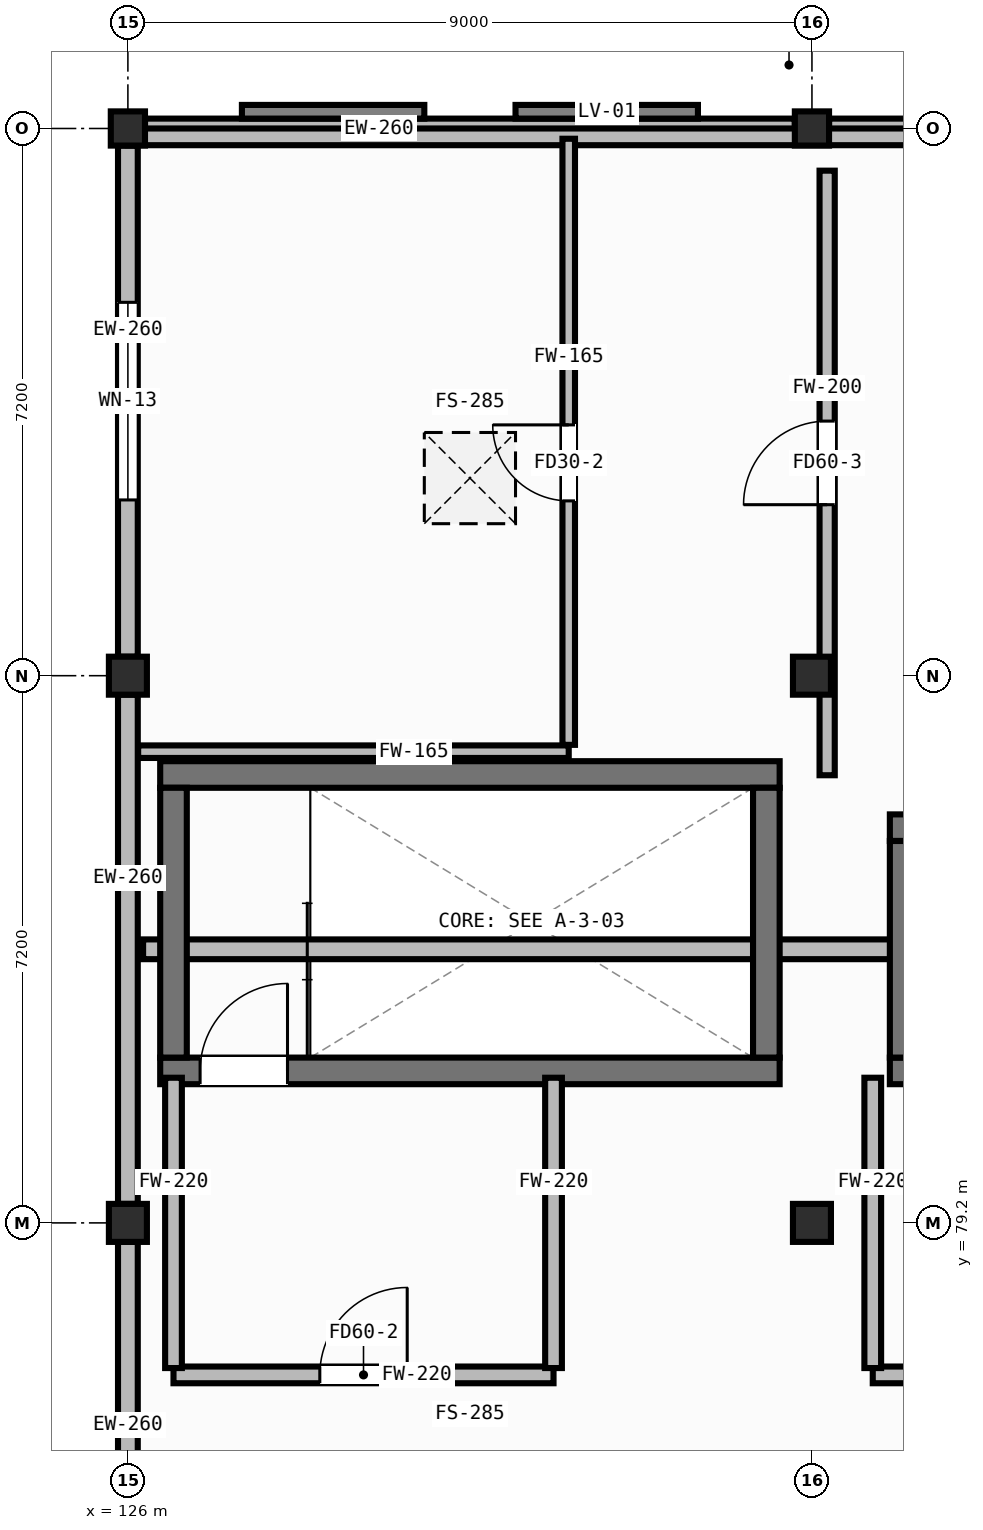
"""IFC4 building model, lengths in metres.
Left out: names, types, materials, properties, quantities, classifications, styles, units other than length and angle.
Written with IfcOpenShell. Run it as: python <this file> out.ifc"""

import sys

from ifc_helpers import new_model, si_unit, direction, frame, frame_2d, origin, origin_2d, place, context, subcontext, project, spatial, rectangle, hollow_rectangle, extrude, element, fill, save


model = new_model("IFC4")
c1 = context("Model", 3, precision=1e-05, world=origin(), true_north=direction((0.0, 1.0)))
c2 = subcontext(c1, "Body", "Model", "MODEL_VIEW")
j1 = project(units=[si_unit("LENGTHUNIT", "METRE"), si_unit("PLANEANGLEUNIT", "RADIAN")], contexts=[c1])
p1 = place(None, origin())
s1 = spatial("IfcSite", under=j1, at=p1, CompositionType="ELEMENT")
p2 = place(p1, origin())
s2 = spatial("IfcBuilding", under=s1, at=p2, CompositionType="ELEMENT")
p3 = place(p2, frame((0.0, 0.0, 31.4)))
s3 = spatial("IfcBuildingStorey", under=s2, at=p3, CompositionType="ELEMENT", Elevation=31.4)
for number, where, z_axis, x_axis in (
    (1, (126.0, 79.2, 0.0), (0.0, 0.0, 1.0), (1.0, 0.0, 0.0)),
    (2, (126.0, 86.4, 0.0), (0.0, 0.0, 1.0), (1.0, 0.0, 0.0)),
):
    element("IfcColumn", number, at=place(p3, frame(where, z_axis=z_axis, x_axis=x_axis)), inside=s3, PredefinedType="COLUMN", context=c2, shape_type="SweptSolid", body=[
        extrude(hollow_rectangle(XDim=0.5, YDim=0.5, WallThickness=0.022, at=origin_2d()), origin(), (0.0, 0.0, 1.0), 3.56),
    ])
p4 = place(p3, frame((126.0, 93.6, 0.0), z_axis=(0.0, 0.0, 1.0), x_axis=(1.0, 0.0, 0.0)))
e3 = element("IfcColumn", 3, at=p4, inside=s3, PredefinedType="COLUMN", context=c2, shape_type="SweptSolid", body=[
    extrude(hollow_rectangle(XDim=0.45, YDim=0.45, WallThickness=0.019, at=origin_2d()), origin(), (0.0, 0.0, 1.0), 3.56),
])
for number, where, z_axis, x_axis in (
    (4, (135.0, 79.2, 0.0), (0.0, 0.0, 1.0), (1.0, 0.0, 0.0)),
    (5, (135.0, 86.4, 0.0), (0.0, 0.0, 1.0), (1.0, 0.0, 0.0)),
):
    element("IfcColumn", number, at=place(p3, frame(where, z_axis=z_axis, x_axis=x_axis)), inside=s3, PredefinedType="COLUMN", context=c2, shape_type="SweptSolid", body=[
        extrude(hollow_rectangle(XDim=0.5, YDim=0.5, WallThickness=0.022, at=origin_2d()), origin(), (0.0, 0.0, 1.0), 3.56),
    ])
p5 = place(p3, frame((135.0, 93.6, 0.0), z_axis=(0.0, 0.0, 1.0), x_axis=(1.0, 0.0, 0.0)))
e6 = element("IfcColumn", 6, at=p5, inside=s3, PredefinedType="COLUMN", context=c2, shape_type="SweptSolid", body=[
    extrude(hollow_rectangle(XDim=0.45, YDim=0.45, WallThickness=0.019, at=origin_2d()), origin(), (0.0, 0.0, 1.0), 3.56),
])
for number, where, z_axis, x_axis in (
    (7, (134.775, 93.6, 0.0), (0.0, 0.0, 1.0), (-1.0, 0.0, 0.0)),
    (8, (143.775, 93.6, 0.0), (0.0, 0.0, 1.0), (-1.0, 0.0, 0.0)),
):
    element("IfcWall", number, at=place(p3, frame(where, z_axis=z_axis, x_axis=x_axis)), inside=s3, PredefinedType="STANDARD", context=c2, shape_type="SweptSolid", body=[
        extrude(rectangle(XDim=8.55, YDim=0.26, at=frame_2d((4.275, 0.0))), origin(), (0.0, 0.0, 1.0), 3.16),
    ])
for number, where, z_axis, x_axis in (
    (9, (126.0, 72.25, 0.0), (0.0, 0.0, 1.0), (0.0, 1.0, 0.0)),
    (10, (126.0, 79.45, 0.0), (0.0, 0.0, 1.0), (0.0, 1.0, 0.0)),
):
    element("IfcWall", number, at=place(p3, frame(where, z_axis=z_axis, x_axis=x_axis)), inside=s3, PredefinedType="STANDARD", context=c2, shape_type="SweptSolid", body=[
        extrude(rectangle(XDim=6.7, YDim=0.26, at=frame_2d((3.35, 0.0))), origin(), (0.0, 0.0, 1.0), 3.16),
    ])
p6 = place(p3, frame((126.0, 86.65, 0.0), z_axis=(0.0, 0.0, 1.0), x_axis=(0.0, 1.0, 0.0)))
e11 = element("IfcWall", 11, at=p6, inside=s3, PredefinedType="STANDARD", context=c2, shape_type="SweptSolid", body=[
    extrude(rectangle(XDim=6.725, YDim=0.26, at=frame_2d((3.363, 0.0))), origin(), (0.0, 0.0, 1.0), 3.16),
])
p7 = place(p6, frame((2.062, 0.0, 0.85)))
e12 = element("IfcOpeningElement", 12, at=p7, cuts=e11, PredefinedType="OPENING", context=c2, shape_type="SweptSolid", body=[
    extrude(rectangle(XDim=2.6, YDim=1.6, at=frame_2d((1.3, 0.8))), frame((0.0, 0.142, 0.0), z_axis=(0.0, -1.0, 0.0), x_axis=(1.0, 0.0, 0.0)), (0.0, 0.0, 1.0), 0.284),
])
p8 = place(p3, frame((126.2, 82.8, 3.8), z_axis=(0.0, 0.0, 1.0), x_axis=(1.0, 0.0, 0.0)))
e13 = element("IfcWall", 13, at=p8, inside=s3, PredefinedType="STANDARD", context=c2, shape_type="SweptSolid", body=[
    extrude(rectangle(XDim=35.6, YDim=0.26, at=frame_2d((17.8, 0.0))), origin(), (0.0, 0.0, 1.0), 2.15),
])
p9 = place(p3, frame((126.0, 93.49, 3.8), z_axis=(0.0, 0.0, 1.0), x_axis=(1.0, 0.0, 0.0)))
e14 = element("IfcWall", 14, at=p9, inside=s3, PredefinedType="PARAPET", context=c2, shape_type="SweptSolid", body=[
    extrude(rectangle(XDim=36.0, YDim=0.22, at=frame_2d((18.0, 0.0))), origin(), (0.0, 0.0, 1.0), 0.9),
])
p10 = place(p3, frame((126.425, 81.2, 0.0), z_axis=(0.0, 0.0, 1.0), x_axis=(1.0, 0.0, 0.0)))
e15 = element("IfcWall", 15, at=p10, inside=s3, PredefinedType="SHEAR", context=c2, shape_type="SweptSolid", body=[
    extrude(rectangle(XDim=8.15, YDim=0.35, at=frame_2d((4.075, 0.0))), origin(), (0.0, 0.0, 1.0), 3.56),
])
p11 = place(p10, frame((0.525, 0.0, 0.0)))
e16 = element("IfcOpeningElement", 16, at=p11, cuts=e15, PredefinedType="OPENING", context=c2, shape_type="SweptSolid", body=[
    extrude(rectangle(XDim=1.15, YDim=2.1, at=frame_2d((0.575, 1.05))), frame((0.0, 0.187, 0.0), z_axis=(0.0, -1.0, 0.0), x_axis=(1.0, 0.0, 0.0)), (0.0, 0.0, 1.0), 0.374),
])
p12 = place(p3, frame((126.425, 85.1, 0.0), z_axis=(0.0, 0.0, 1.0), x_axis=(1.0, 0.0, 0.0)))
e17 = element("IfcWall", 17, at=p12, inside=s3, PredefinedType="SHEAR", context=c2, shape_type="SweptSolid", body=[
    extrude(rectangle(XDim=8.15, YDim=0.35, at=frame_2d((4.075, 0.0))), origin(), (0.0, 0.0, 1.0), 3.56),
])
for number, where, z_axis, x_axis in (
    (18, (126.6, 81.375, 0.0), (0.0, 0.0, 1.0), (0.0, 1.0, 0.0)),
    (19, (134.4, 81.375, 0.0), (0.0, 0.0, 1.0), (0.0, 1.0, 0.0)),
):
    element("IfcWall", number, at=place(p3, frame(where, z_axis=z_axis, x_axis=x_axis)), inside=s3, PredefinedType="SHEAR", context=c2, shape_type="SweptSolid", body=[
        extrude(rectangle(XDim=3.55, YDim=0.35, at=frame_2d((1.775, 0.0))), origin(), (0.0, 0.0, 1.0), 3.56),
    ])
p13 = place(p3, frame((136.025, 81.2, 0.0), z_axis=(0.0, 0.0, 1.0), x_axis=(1.0, 0.0, 0.0)))
e20 = element("IfcWall", 20, at=p13, inside=s3, PredefinedType="SHEAR", context=c2, shape_type="SweptSolid", body=[
    extrude(rectangle(XDim=2.75, YDim=0.35, at=frame_2d((1.375, 0.0))), origin(), (0.0, 0.0, 1.0), 4.25),
])
p14 = place(p13, frame((0.8, 0.0, 0.0)))
e21 = element("IfcOpeningElement", 21, at=p14, cuts=e20, PredefinedType="OPENING", context=c2, shape_type="SweptSolid", body=[
    extrude(rectangle(XDim=1.15, YDim=2.12, at=frame_2d((0.575, 1.06))), frame((0.0, 0.187, 0.0), z_axis=(0.0, -1.0, 0.0), x_axis=(1.0, 0.0, 0.0)), (0.0, 0.0, 1.0), 0.374),
])
p15 = place(p3, frame((136.025, 84.4, 0.0), z_axis=(0.0, 0.0, 1.0), x_axis=(1.0, 0.0, 0.0)))
e22 = element("IfcWall", 22, at=p15, inside=s3, PredefinedType="SHEAR", context=c2, shape_type="SweptSolid", body=[
    extrude(rectangle(XDim=2.75, YDim=0.35, at=frame_2d((1.375, 0.0))), origin(), (0.0, 0.0, 1.0), 4.25),
])
p16 = place(p3, frame((136.2, 81.375, 0.0), z_axis=(0.0, 0.0, 1.0), x_axis=(0.0, 1.0, 0.0)))
e23 = element("IfcWall", 23, at=p16, inside=s3, PredefinedType="SHEAR", context=c2, shape_type="SweptSolid", body=[
    extrude(rectangle(XDim=2.85, YDim=0.35, at=frame_2d((1.425, 0.0))), origin(), (0.0, 0.0, 1.0), 4.25),
])
p17 = place(p3, frame((126.6, 77.2, 0.0), z_axis=(0.0, 0.0, 1.0), x_axis=(1.0, 0.0, 0.0)))
e24 = element("IfcWall", 24, at=p17, inside=s3, PredefinedType="PARTITIONING", context=c2, shape_type="SweptSolid", body=[
    extrude(rectangle(XDim=5.0, YDim=0.22, at=frame_2d((2.5, 0.0))), origin(), (0.0, 0.0, 1.0), 3.56),
])
p18 = place(p17, frame((1.925, 0.0, 0.0)))
e25 = element("IfcOpeningElement", 25, at=p18, cuts=e24, PredefinedType="OPENING", context=c2, shape_type="SweptSolid", body=[
    extrude(rectangle(XDim=1.15, YDim=2.1, at=frame_2d((0.575, 1.05))), frame((0.0, 0.122, 0.0), z_axis=(0.0, -1.0, 0.0), x_axis=(1.0, 0.0, 0.0)), (0.0, 0.0, 1.0), 0.244),
])
for number, where, z_axis, x_axis in (
    (26, (126.6, 77.29, 0.0), (0.0, 0.0, 1.0), (0.0, 1.0, 0.0)),
    (27, (131.6, 77.29, 0.0), (0.0, 0.0, 1.0), (0.0, 1.0, 0.0)),
):
    element("IfcWall", number, at=place(p3, frame(where, z_axis=z_axis, x_axis=x_axis)), inside=s3, PredefinedType="PARTITIONING", context=c2, shape_type="SweptSolid", body=[
        extrude(rectangle(XDim=3.82, YDim=0.22, at=frame_2d((1.91, 0.0))), origin(), (0.0, 0.0, 1.0), 3.56),
    ])
p19 = place(p3, frame((135.8, 77.2, 0.0), z_axis=(0.0, 0.0, 1.0), x_axis=(1.0, 0.0, 0.0)))
e28 = element("IfcWall", 28, at=p19, inside=s3, PredefinedType="PARTITIONING", context=c2, shape_type="SweptSolid", body=[
    extrude(rectangle(XDim=7.8, YDim=0.22, at=frame_2d((3.9, 0.0))), origin(), (0.0, 0.0, 1.0), 3.56),
])
p20 = place(p19, frame((3.175, 0.0, 0.0)))
e29 = element("IfcOpeningElement", 29, at=p20, cuts=e28, PredefinedType="OPENING", context=c2, shape_type="SweptSolid", body=[
    extrude(rectangle(XDim=1.05, YDim=2.02, at=frame_2d((0.525, 1.01))), frame((0.0, 0.122, 0.0), z_axis=(0.0, -1.0, 0.0), x_axis=(1.0, 0.0, 0.0)), (0.0, 0.0, 1.0), 0.244),
])
p21 = place(p3, frame((135.8, 77.29, 0.0), z_axis=(0.0, 0.0, 1.0), x_axis=(0.0, 1.0, 0.0)))
e30 = element("IfcWall", 30, at=p21, inside=s3, PredefinedType="PARTITIONING", context=c2, shape_type="SweptSolid", body=[
    extrude(rectangle(XDim=3.82, YDim=0.22, at=frame_2d((1.91, 0.0))), origin(), (0.0, 0.0, 1.0), 3.56),
])
p22 = place(p3, frame((126.135, 85.4, 0.0), z_axis=(0.0, 0.0, 1.0), x_axis=(1.0, 0.0, 0.0)))
e31 = element("IfcWall", 31, at=p22, inside=s3, PredefinedType="PARTITIONING", context=c2, shape_type="SweptSolid", body=[
    extrude(rectangle(XDim=5.665, YDim=0.165, at=frame_2d((2.833, 0.0))), origin(), (0.0, 0.0, 1.0), 3.56),
])
p23 = place(p3, frame((131.8, 85.49, 0.0), z_axis=(0.0, 0.0, 1.0), x_axis=(0.0, 1.0, 0.0)))
e32 = element("IfcWall", 32, at=p23, inside=s3, PredefinedType="PARTITIONING", context=c2, shape_type="SweptSolid", body=[
    extrude(rectangle(XDim=7.975, YDim=0.165, at=frame_2d((3.988, 0.0))), origin(), (0.0, 0.0, 1.0), 3.56),
])
p24 = place(p23, frame((3.21, 0.0, 0.0)))
e33 = element("IfcOpeningElement", 33, at=p24, cuts=e32, PredefinedType="OPENING", context=c2, shape_type="SweptSolid", body=[
    extrude(rectangle(XDim=1.0, YDim=2.08, at=frame_2d((0.5, 1.04))), frame((0.0, 0.094, 0.0), z_axis=(0.0, -1.0, 0.0), x_axis=(1.0, 0.0, 0.0)), (0.0, 0.0, 1.0), 0.189),
])
p25 = place(p3, frame((135.2, 85.09, 0.0), z_axis=(0.0, 0.0, 1.0), x_axis=(0.0, 1.0, 0.0)))
e34 = element("IfcWall", 34, at=p25, inside=s3, PredefinedType="PARTITIONING", context=c2, shape_type="SweptSolid", body=[
    extrude(rectangle(XDim=7.955, YDim=0.2, at=frame_2d((3.978, 0.0))), origin(), (0.0, 0.0, 1.0), 2.84),
])
p26 = place(p25, frame((3.56, 0.0, 0.0)))
e35 = element("IfcOpeningElement", 35, at=p26, cuts=e34, PredefinedType="OPENING", context=c2, shape_type="SweptSolid", body=[
    extrude(rectangle(XDim=1.1, YDim=2.08, at=frame_2d((0.55, 1.04))), frame((0.0, 0.112, 0.0), z_axis=(0.0, -1.0, 0.0), x_axis=(1.0, 0.0, 0.0)), (0.0, 0.0, 1.0), 0.224),
])
p27 = place(p7, origin())
e36 = element("IfcWindow", 36, at=p27, inside=s3, PartitioningType="DOUBLE_PANEL_VERTICAL", PredefinedType="WINDOW", context=c2, shape_type="SweptSolid", body=[
    extrude(rectangle(XDim=2.6, YDim=1.6, at=frame_2d((1.3, 0.8))), frame((0.0, 0.03, 0.0), z_axis=(0.0, -1.0, 0.0), x_axis=(1.0, 0.0, 0.0)), (0.0, 0.0, 1.0), 0.06),
])
fill(e12, e36)
p28 = place(p2, frame((0.0, 0.0, 35.2)))
p29 = place(p28, frame((0.0, 0.0, -0.24)))
p30 = place(p29, frame((130.5, 89.0, 0.18)))
e37 = element("IfcWindow", 37, at=p30, inside=s3, PartitioningType="SINGLE_PANEL", PredefinedType="SKYLIGHT", context=c2, shape_type="SweptSolid", body=[
    extrude(rectangle(XDim=1.2, YDim=1.2, at=origin_2d()), origin(), (0.0, 0.0, 1.0), 0.06),
])
p31 = place(p11, origin())
e38 = element("IfcDoor", 38, at=p31, inside=s3, OperationType="SINGLE_SWING_RIGHT", PredefinedType="DOOR", context=c2, shape_type="SweptSolid", body=[
    extrude(rectangle(XDim=1.15, YDim=2.1, at=frame_2d((0.575, 1.05))), frame((0.0, 0.025, 0.0), z_axis=(0.0, -1.0, 0.0), x_axis=(1.0, 0.0, 0.0)), (0.0, 0.0, 1.0), 0.05),
])
fill(e16, e38)
p32 = place(p18, origin())
e39 = element("IfcDoor", 39, at=p32, inside=s3, OperationType="SINGLE_SWING_RIGHT", PredefinedType="DOOR", context=c2, shape_type="SweptSolid", body=[
    extrude(rectangle(XDim=1.15, YDim=2.1, at=frame_2d((0.575, 1.05))), frame((0.0, 0.025, 0.0), z_axis=(0.0, -1.0, 0.0), x_axis=(1.0, 0.0, 0.0)), (0.0, 0.0, 1.0), 0.05),
])
fill(e25, e39)
p33 = place(p24, origin())
e40 = element("IfcDoor", 40, at=p33, inside=s3, OperationType="SINGLE_SWING_RIGHT", PredefinedType="DOOR", context=c2, shape_type="SweptSolid", body=[
    extrude(rectangle(XDim=1.0, YDim=2.08, at=frame_2d((0.5, 1.04))), frame((0.0, 0.025, 0.0), z_axis=(0.0, -1.0, 0.0), x_axis=(1.0, 0.0, 0.0)), (0.0, 0.0, 1.0), 0.05),
])
fill(e33, e40)
p34 = place(p26, origin())
e41 = element("IfcDoor", 41, at=p34, inside=s3, OperationType="SINGLE_SWING_LEFT", PredefinedType="DOOR", context=c2, shape_type="SweptSolid", body=[
    extrude(rectangle(XDim=1.1, YDim=2.08, at=frame_2d((0.55, 1.04))), frame((0.0, 0.025, 0.0), z_axis=(0.0, -1.0, 0.0), x_axis=(1.0, 0.0, 0.0)), (0.0, 0.0, 1.0), 0.05),
])
fill(e35, e41)
save(model, sys.argv[1])
